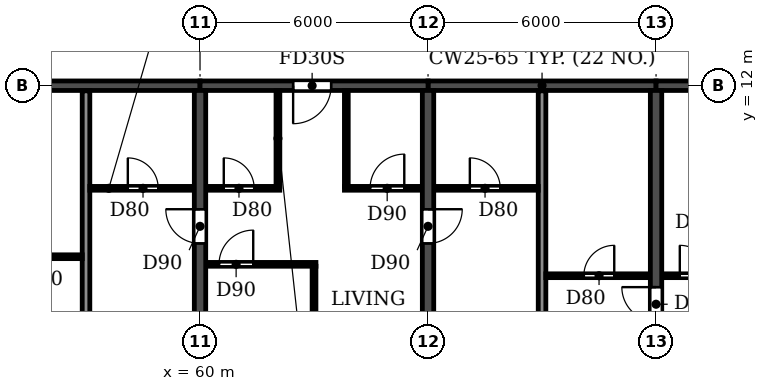
"""IFC4 building model, lengths in metres.
Left out: names, types, materials, properties, quantities, classifications, styles, units other than length and angle.
Written with IfcOpenShell. Run it as: python <this file> out.ifc"""

import sys

from ifc_helpers import new_model, si_unit, direction, frame, frame_2d, origin, place, context, subcontext, project, spatial, rectangle, extrude, element, fill, save


model = new_model("IFC4")
c1 = context("Model", 3, precision=1e-05, world=origin(), true_north=direction((0.0, 1.0)))
c2 = subcontext(c1, "Body", "Model", "MODEL_VIEW")
j1 = project(units=[si_unit("LENGTHUNIT", "METRE"), si_unit("PLANEANGLEUNIT", "RADIAN")], contexts=[c1])
p1 = place(None, origin())
s1 = spatial("IfcSite", under=j1, at=p1, CompositionType="ELEMENT")
p2 = place(p1, origin())
s2 = spatial("IfcBuilding", under=s1, at=p2, CompositionType="ELEMENT")
p3 = place(p2, frame((0.0, 0.0, 132.3)))
s3 = spatial("IfcBuildingStorey", under=s2, at=p3, CompositionType="ELEMENT", Elevation=132.3)
p4 = place(p3, frame((60.0, 0.2, 0.0), z_axis=(0.0, 0.0, 1.0), x_axis=(0.0, 1.0, 0.0)))
e1 = element("IfcWall", 1, at=p4, inside=s3, PredefinedType="SHEAR", context=c2, shape_type="SweptSolid", body=[
    extrude(rectangle(XDim=11.675, YDim=0.3, at=frame_2d((5.837, 0.0))), origin(), (0.0, 0.0, 1.0), 3.07),
])
p5 = place(p4, frame((7.65, 0.0, 0.0)))
e2 = element("IfcOpeningElement", 2, at=p5, cuts=e1, PredefinedType="OPENING", context=c2, shape_type="SweptSolid", body=[
    extrude(rectangle(XDim=0.9, YDim=2.1, at=frame_2d((0.45, 1.05))), frame((0.0, 0.16, 0.0), z_axis=(0.0, -1.0, 0.0), x_axis=(1.0, 0.0, 0.0)), (0.0, 0.0, 1.0), 0.32),
])
p6 = place(p3, frame((66.0, 0.2, 0.0), z_axis=(0.0, 0.0, 1.0), x_axis=(0.0, 1.0, 0.0)))
e3 = element("IfcWall", 3, at=p6, inside=s3, PredefinedType="SHEAR", context=c2, shape_type="SweptSolid", body=[
    extrude(rectangle(XDim=11.675, YDim=0.3, at=frame_2d((5.837, 0.0))), origin(), (0.0, 0.0, 1.0), 3.07),
])
p7 = place(p6, frame((7.65, 0.0, 0.0)))
e4 = element("IfcOpeningElement", 4, at=p7, cuts=e3, PredefinedType="OPENING", context=c2, shape_type="SweptSolid", body=[
    extrude(rectangle(XDim=0.9, YDim=2.1, at=frame_2d((0.45, 1.05))), frame((0.0, 0.16, 0.0), z_axis=(0.0, -1.0, 0.0), x_axis=(1.0, 0.0, 0.0)), (0.0, 0.0, 1.0), 0.32),
])
p8 = place(p3, frame((72.0, 0.2, 0.0), z_axis=(0.0, 0.0, 1.0), x_axis=(0.0, 1.0, 0.0)))
e5 = element("IfcWall", 5, at=p8, inside=s3, PredefinedType="SHEAR", context=c2, shape_type="SweptSolid", body=[
    extrude(rectangle(XDim=11.675, YDim=0.3, at=frame_2d((5.837, 0.0))), origin(), (0.0, 0.0, 1.0), 3.07),
])
p9 = place(p8, frame((5.6, 0.0, 0.0)))
e6 = element("IfcOpeningElement", 6, at=p9, cuts=e5, PredefinedType="OPENING", context=c2, shape_type="SweptSolid", body=[
    extrude(rectangle(XDim=0.9, YDim=2.1, at=frame_2d((0.45, 1.05))), frame((0.0, 0.16, 0.0), z_axis=(0.0, -1.0, 0.0), x_axis=(1.0, 0.0, 0.0)), (0.0, 0.0, 1.0), 0.32),
])
p10 = place(p3, frame((54.0, 12.0, 0.0), z_axis=(0.0, 0.0, 1.0), x_axis=(1.0, 0.0, 0.0)))
e7 = element("IfcWall", 7, at=p10, inside=s3, PredefinedType="SHEAR", context=c2, shape_type="SweptSolid", body=[
    extrude(rectangle(XDim=6.0, YDim=0.25, at=frame_2d((3.0, 0.0))), origin(), (0.0, 0.0, 1.0), 2.47),
])
p11 = place(p3, frame((60.0, 12.0, 0.0), z_axis=(0.0, 0.0, 1.0), x_axis=(1.0, 0.0, 0.0)))
e8 = element("IfcWall", 8, at=p11, inside=s3, PredefinedType="SHEAR", context=c2, shape_type="SweptSolid", body=[
    extrude(rectangle(XDim=6.0, YDim=0.25, at=frame_2d((3.0, 0.0))), origin(), (0.0, 0.0, 1.0), 2.47),
])
p12 = place(p11, frame((2.45, 0.0, 0.0)))
e9 = element("IfcOpeningElement", 9, at=p12, cuts=e8, PredefinedType="OPENING", context=c2, shape_type="SweptSolid", body=[
    extrude(rectangle(XDim=1.0, YDim=2.1, at=frame_2d((0.5, 1.05))), frame((0.0, 0.135, 0.0), z_axis=(0.0, -1.0, 0.0), x_axis=(1.0, 0.0, 0.0)), (0.0, 0.0, 1.0), 0.27),
])
p13 = place(p3, frame((66.0, 12.0, 0.0), z_axis=(0.0, 0.0, 1.0), x_axis=(1.0, 0.0, 0.0)))
e10 = element("IfcWall", 10, at=p13, inside=s3, PredefinedType="SHEAR", context=c2, shape_type="SweptSolid", body=[
    extrude(rectangle(XDim=6.0, YDim=0.25, at=frame_2d((3.0, 0.0))), origin(), (0.0, 0.0, 1.0), 2.47),
])
p14 = place(p3, frame((72.0, 12.0, 0.0), z_axis=(0.0, 0.0, 1.0), x_axis=(1.0, 0.0, 0.0)))
e11 = element("IfcWall", 11, at=p14, inside=s3, PredefinedType="SHEAR", context=c2, shape_type="SweptSolid", body=[
    extrude(rectangle(XDim=6.0, YDim=0.25, at=frame_2d((3.0, 0.0))), origin(), (0.0, 0.0, 1.0), 2.47),
])
p15 = place(p14, frame((2.45, 0.0, 0.0)))
e12 = element("IfcOpeningElement", 12, at=p15, cuts=e11, PredefinedType="OPENING", context=c2, shape_type="SweptSolid", body=[
    extrude(rectangle(XDim=1.0, YDim=2.1, at=frame_2d((0.5, 1.05))), frame((0.0, 0.135, 0.0), z_axis=(0.0, -1.0, 0.0), x_axis=(1.0, 0.0, 0.0)), (0.0, 0.0, 1.0), 0.27),
])
for number, where, z_axis, x_axis in (
    (13, (57.0, 0.06, 0.0), (0.0, 0.0, 1.0), (0.0, 1.0, 0.0)),
    (14, (69.0, 0.06, 0.0), (0.0, 0.0, 1.0), (0.0, 1.0, 0.0)),
):
    element("IfcWall", number, at=place(p3, frame(where, z_axis=z_axis, x_axis=x_axis)), inside=s3, PredefinedType="PARTITIONING", context=c2, shape_type="SweptSolid", body=[
        extrude(rectangle(XDim=11.805, YDim=0.2, at=frame_2d((5.902, 0.0))), origin(), (0.0, 0.0, 1.0), 3.07),
    ])
p16 = place(p3, frame((69.1, 7.0, 0.0), z_axis=(0.0, 0.0, 1.0), x_axis=(1.0, 0.0, 0.0)))
e15 = element("IfcWall", 15, at=p16, inside=s3, PredefinedType="PARTITIONING", context=c2, shape_type="SweptSolid", body=[
    extrude(rectangle(XDim=2.74, YDim=0.1, at=frame_2d((1.37, 0.0))), origin(), (0.0, 0.0, 1.0), 3.07),
])
p17 = place(p16, frame((1.0, 0.0, 0.0)))
e16 = element("IfcOpeningElement", 16, at=p17, cuts=e15, PredefinedType="OPENING", context=c2, shape_type="SweptSolid", body=[
    extrude(rectangle(XDim=0.8, YDim=2.1, at=frame_2d((0.4, 1.05))), frame((0.0, 0.06, 0.0), z_axis=(0.0, -1.0, 0.0), x_axis=(1.0, 0.0, 0.0)), (0.0, 0.0, 1.0), 0.12),
])
p18 = place(p3, frame((72.16, 7.0, 0.0), z_axis=(0.0, 0.0, 1.0), x_axis=(1.0, 0.0, 0.0)))
e17 = element("IfcWall", 17, at=p18, inside=s3, PredefinedType="PARTITIONING", context=c2, shape_type="SweptSolid", body=[
    extrude(rectangle(XDim=1.94, YDim=0.1, at=frame_2d((0.97, 0.0))), origin(), (0.0, 0.0, 1.0), 3.07),
])
p19 = place(p18, frame((0.465, 0.0, 0.0)))
e18 = element("IfcOpeningElement", 18, at=p19, cuts=e17, PredefinedType="OPENING", context=c2, shape_type="SweptSolid", body=[
    extrude(rectangle(XDim=0.8, YDim=2.1, at=frame_2d((0.4, 1.05))), frame((0.0, 0.06, 0.0), z_axis=(0.0, -1.0, 0.0), x_axis=(1.0, 0.0, 0.0)), (0.0, 0.0, 1.0), 0.12),
])
p20 = place(p3, frame((60.16, 7.3, 0.0), z_axis=(0.0, 0.0, 1.0), x_axis=(1.0, 0.0, 0.0)))
e19 = element("IfcWall", 19, at=p20, inside=s3, PredefinedType="PARTITIONING", context=c2, shape_type="SweptSolid", body=[
    extrude(rectangle(XDim=2.89, YDim=0.1, at=frame_2d((1.445, 0.0))), origin(), (0.0, 0.0, 1.0), 3.07),
])
p21 = place(p20, frame((0.34, 0.0, 0.0)))
e20 = element("IfcOpeningElement", 20, at=p21, cuts=e19, PredefinedType="OPENING", context=c2, shape_type="SweptSolid", body=[
    extrude(rectangle(XDim=0.9, YDim=2.1, at=frame_2d((0.45, 1.05))), frame((0.0, 0.06, 0.0), z_axis=(0.0, -1.0, 0.0), x_axis=(1.0, 0.0, 0.0)), (0.0, 0.0, 1.0), 0.12),
])
p22 = place(p3, frame((54.16, 7.5, 0.0), z_axis=(0.0, 0.0, 1.0), x_axis=(1.0, 0.0, 0.0)))
e21 = element("IfcWall", 21, at=p22, inside=s3, PredefinedType="PARTITIONING", context=c2, shape_type="SweptSolid", body=[
    extrude(rectangle(XDim=2.74, YDim=0.1, at=frame_2d((1.37, 0.0))), origin(), (0.0, 0.0, 1.0), 3.07),
])
p23 = place(p22, frame((0.94, 0.0, 0.0)))
e22 = element("IfcOpeningElement", 22, at=p23, cuts=e21, PredefinedType="OPENING", context=c2, shape_type="SweptSolid", body=[
    extrude(rectangle(XDim=0.8, YDim=2.1, at=frame_2d((0.4, 1.05))), frame((0.0, 0.06, 0.0), z_axis=(0.0, -1.0, 0.0), x_axis=(1.0, 0.0, 0.0)), (0.0, 0.0, 1.0), 0.12),
])
p24 = place(p3, frame((57.1, 9.3, 0.0), z_axis=(0.0, 0.0, 1.0), x_axis=(1.0, 0.0, 0.0)))
e23 = element("IfcWall", 23, at=p24, inside=s3, PredefinedType="PARTITIONING", context=c2, shape_type="SweptSolid", body=[
    extrude(rectangle(XDim=2.74, YDim=0.1, at=frame_2d((1.37, 0.0))), origin(), (0.0, 0.0, 1.0), 3.07),
])
p25 = place(p24, frame((1.0, 0.0, 0.0)))
e24 = element("IfcOpeningElement", 24, at=p25, cuts=e23, PredefinedType="OPENING", context=c2, shape_type="SweptSolid", body=[
    extrude(rectangle(XDim=0.8, YDim=2.1, at=frame_2d((0.4, 1.05))), frame((0.0, 0.06, 0.0), z_axis=(0.0, -1.0, 0.0), x_axis=(1.0, 0.0, 0.0)), (0.0, 0.0, 1.0), 0.12),
])
p26 = place(p3, frame((60.16, 9.3, 0.0), z_axis=(0.0, 0.0, 1.0), x_axis=(1.0, 0.0, 0.0)))
e25 = element("IfcWall", 25, at=p26, inside=s3, PredefinedType="PARTITIONING", context=c2, shape_type="SweptSolid", body=[
    extrude(rectangle(XDim=1.94, YDim=0.1, at=frame_2d((0.97, 0.0))), origin(), (0.0, 0.0, 1.0), 3.07),
])
p27 = place(p26, frame((0.465, 0.0, 0.0)))
e26 = element("IfcOpeningElement", 26, at=p27, cuts=e25, PredefinedType="OPENING", context=c2, shape_type="SweptSolid", body=[
    extrude(rectangle(XDim=0.8, YDim=2.1, at=frame_2d((0.4, 1.05))), frame((0.0, 0.06, 0.0), z_axis=(0.0, -1.0, 0.0), x_axis=(1.0, 0.0, 0.0)), (0.0, 0.0, 1.0), 0.12),
])
p28 = place(p3, frame((63.8, 9.3, 0.0), z_axis=(0.0, 0.0, 1.0), x_axis=(1.0, 0.0, 0.0)))
e27 = element("IfcWall", 27, at=p28, inside=s3, PredefinedType="PARTITIONING", context=c2, shape_type="SweptSolid", body=[
    extrude(rectangle(XDim=2.04, YDim=0.1, at=frame_2d((1.02, 0.0))), origin(), (0.0, 0.0, 1.0), 3.07),
])
p29 = place(p28, frame((0.675, 0.0, 0.0)))
e28 = element("IfcOpeningElement", 28, at=p29, cuts=e27, PredefinedType="OPENING", context=c2, shape_type="SweptSolid", body=[
    extrude(rectangle(XDim=0.9, YDim=2.1, at=frame_2d((0.45, 1.05))), frame((0.0, 0.06, 0.0), z_axis=(0.0, -1.0, 0.0), x_axis=(1.0, 0.0, 0.0)), (0.0, 0.0, 1.0), 0.12),
])
p30 = place(p3, frame((66.16, 9.3, 0.0), z_axis=(0.0, 0.0, 1.0), x_axis=(1.0, 0.0, 0.0)))
e29 = element("IfcWall", 29, at=p30, inside=s3, PredefinedType="PARTITIONING", context=c2, shape_type="SweptSolid", body=[
    extrude(rectangle(XDim=2.74, YDim=0.1, at=frame_2d((1.37, 0.0))), origin(), (0.0, 0.0, 1.0), 3.07),
])
p31 = place(p30, frame((0.94, 0.0, 0.0)))
e30 = element("IfcOpeningElement", 30, at=p31, cuts=e29, PredefinedType="OPENING", context=c2, shape_type="SweptSolid", body=[
    extrude(rectangle(XDim=0.8, YDim=2.1, at=frame_2d((0.4, 1.05))), frame((0.0, 0.06, 0.0), z_axis=(0.0, -1.0, 0.0), x_axis=(1.0, 0.0, 0.0)), (0.0, 0.0, 1.0), 0.12),
])
p32 = place(p3, frame((62.05, 9.35, 0.0), z_axis=(0.0, 0.0, 1.0), x_axis=(0.0, 1.0, 0.0)))
e31 = element("IfcWall", 31, at=p32, inside=s3, PredefinedType="PARTITIONING", context=c2, shape_type="SweptSolid", body=[
    extrude(rectangle(XDim=2.515, YDim=0.1, at=frame_2d((1.257, 0.0))), origin(), (0.0, 0.0, 1.0), 3.07),
])
p33 = place(p3, frame((63.0, 0.06, 0.0), z_axis=(0.0, 0.0, 1.0), x_axis=(0.0, 1.0, 0.0)))
e32 = element("IfcWall", 32, at=p33, inside=s3, PredefinedType="PARTITIONING", context=c2, shape_type="SweptSolid", body=[
    extrude(rectangle(XDim=7.19, YDim=0.1, at=frame_2d((3.595, 0.0))), origin(), (0.0, 0.0, 1.0), 3.07),
])
p34 = place(p3, frame((63.85, 9.35, 0.0), z_axis=(0.0, 0.0, 1.0), x_axis=(0.0, 1.0, 0.0)))
e33 = element("IfcWall", 33, at=p34, inside=s3, PredefinedType="PARTITIONING", context=c2, shape_type="SweptSolid", body=[
    extrude(rectangle(XDim=2.515, YDim=0.1, at=frame_2d((1.257, 0.0))), origin(), (0.0, 0.0, 1.0), 3.07),
])
p35 = place(p25, origin())
e34 = element("IfcDoor", 34, at=p35, inside=s3, OperationType="SINGLE_SWING_LEFT", PredefinedType="DOOR", context=c2, shape_type="SweptSolid", body=[
    extrude(rectangle(XDim=0.8, YDim=2.1, at=frame_2d((0.4, 1.05))), frame((0.0, 0.025, 0.0), z_axis=(0.0, -1.0, 0.0), x_axis=(1.0, 0.0, 0.0)), (0.0, 0.0, 1.0), 0.05),
])
fill(e24, e34)
p36 = place(p31, origin())
e35 = element("IfcDoor", 35, at=p36, inside=s3, OperationType="SINGLE_SWING_LEFT", PredefinedType="DOOR", context=c2, shape_type="SweptSolid", body=[
    extrude(rectangle(XDim=0.8, YDim=2.1, at=frame_2d((0.4, 1.05))), frame((0.0, 0.025, 0.0), z_axis=(0.0, -1.0, 0.0), x_axis=(1.0, 0.0, 0.0)), (0.0, 0.0, 1.0), 0.05),
])
fill(e30, e35)
p37 = place(p5, origin())
e36 = element("IfcDoor", 36, at=p37, inside=s3, OperationType="SINGLE_SWING_RIGHT", PredefinedType="DOOR", context=c2, shape_type="SweptSolid", body=[
    extrude(rectangle(XDim=0.9, YDim=2.1, at=frame_2d((0.45, 1.05))), frame((0.0, 0.025, 0.0), z_axis=(0.0, -1.0, 0.0), x_axis=(1.0, 0.0, 0.0)), (0.0, 0.0, 1.0), 0.05),
])
fill(e2, e36)
p38 = place(p21, origin())
e37 = element("IfcDoor", 37, at=p38, inside=s3, OperationType="SINGLE_SWING_RIGHT", PredefinedType="DOOR", context=c2, shape_type="SweptSolid", body=[
    extrude(rectangle(XDim=0.9, YDim=2.1, at=frame_2d((0.45, 1.05))), frame((0.0, 0.025, 0.0), z_axis=(0.0, -1.0, 0.0), x_axis=(1.0, 0.0, 0.0)), (0.0, 0.0, 1.0), 0.05),
])
fill(e20, e37)
p39 = place(p27, origin())
e38 = element("IfcDoor", 38, at=p39, inside=s3, OperationType="SINGLE_SWING_LEFT", PredefinedType="DOOR", context=c2, shape_type="SweptSolid", body=[
    extrude(rectangle(XDim=0.8, YDim=2.1, at=frame_2d((0.4, 1.05))), frame((0.0, 0.025, 0.0), z_axis=(0.0, -1.0, 0.0), x_axis=(1.0, 0.0, 0.0)), (0.0, 0.0, 1.0), 0.05),
])
fill(e26, e38)
p40 = place(p12, frame((1.0, 0.0, 0.0), z_axis=(0.0, 0.0, 1.0), x_axis=(-1.0, 0.0, 0.0)))
e39 = element("IfcDoor", 39, at=p40, inside=s3, OperationType="SINGLE_SWING_RIGHT", PredefinedType="DOOR", context=c2, shape_type="SweptSolid", body=[
    extrude(rectangle(XDim=1.0, YDim=2.1, at=frame_2d((0.5, 1.05))), frame((0.0, 0.025, 0.0), z_axis=(0.0, -1.0, 0.0), x_axis=(1.0, 0.0, 0.0)), (0.0, 0.0, 1.0), 0.05),
])
fill(e9, e39)
p41 = place(p29, origin())
e40 = element("IfcDoor", 40, at=p41, inside=s3, OperationType="SINGLE_SWING_RIGHT", PredefinedType="DOOR", context=c2, shape_type="SweptSolid", body=[
    extrude(rectangle(XDim=0.9, YDim=2.1, at=frame_2d((0.45, 1.05))), frame((0.0, 0.025, 0.0), z_axis=(0.0, -1.0, 0.0), x_axis=(1.0, 0.0, 0.0)), (0.0, 0.0, 1.0), 0.05),
])
fill(e28, e40)
p42 = place(p7, frame((0.9, 0.0, 0.0), z_axis=(0.0, 0.0, 1.0), x_axis=(-1.0, 0.0, 0.0)))
e41 = element("IfcDoor", 41, at=p42, inside=s3, OperationType="SINGLE_SWING_LEFT", PredefinedType="DOOR", context=c2, shape_type="SweptSolid", body=[
    extrude(rectangle(XDim=0.9, YDim=2.1, at=frame_2d((0.45, 1.05))), frame((0.0, 0.025, 0.0), z_axis=(0.0, -1.0, 0.0), x_axis=(1.0, 0.0, 0.0)), (0.0, 0.0, 1.0), 0.05),
])
fill(e4, e41)
p43 = place(p17, origin())
e42 = element("IfcDoor", 42, at=p43, inside=s3, OperationType="SINGLE_SWING_RIGHT", PredefinedType="DOOR", context=c2, shape_type="SweptSolid", body=[
    extrude(rectangle(XDim=0.8, YDim=2.1, at=frame_2d((0.4, 1.05))), frame((0.0, 0.025, 0.0), z_axis=(0.0, -1.0, 0.0), x_axis=(1.0, 0.0, 0.0)), (0.0, 0.0, 1.0), 0.05),
])
fill(e16, e42)
p44 = place(p9, origin())
e43 = element("IfcDoor", 43, at=p44, inside=s3, OperationType="SINGLE_SWING_RIGHT", PredefinedType="DOOR", context=c2, shape_type="SweptSolid", body=[
    extrude(rectangle(XDim=0.9, YDim=2.1, at=frame_2d((0.45, 1.05))), frame((0.0, 0.025, 0.0), z_axis=(0.0, -1.0, 0.0), x_axis=(1.0, 0.0, 0.0)), (0.0, 0.0, 1.0), 0.05),
])
fill(e6, e43)
p45 = place(p19, origin())
e44 = element("IfcDoor", 44, at=p45, inside=s3, OperationType="SINGLE_SWING_LEFT", PredefinedType="DOOR", context=c2, shape_type="SweptSolid", body=[
    extrude(rectangle(XDim=0.8, YDim=2.1, at=frame_2d((0.4, 1.05))), frame((0.0, 0.025, 0.0), z_axis=(0.0, -1.0, 0.0), x_axis=(1.0, 0.0, 0.0)), (0.0, 0.0, 1.0), 0.05),
])
fill(e18, e44)
save(model, sys.argv[1])
